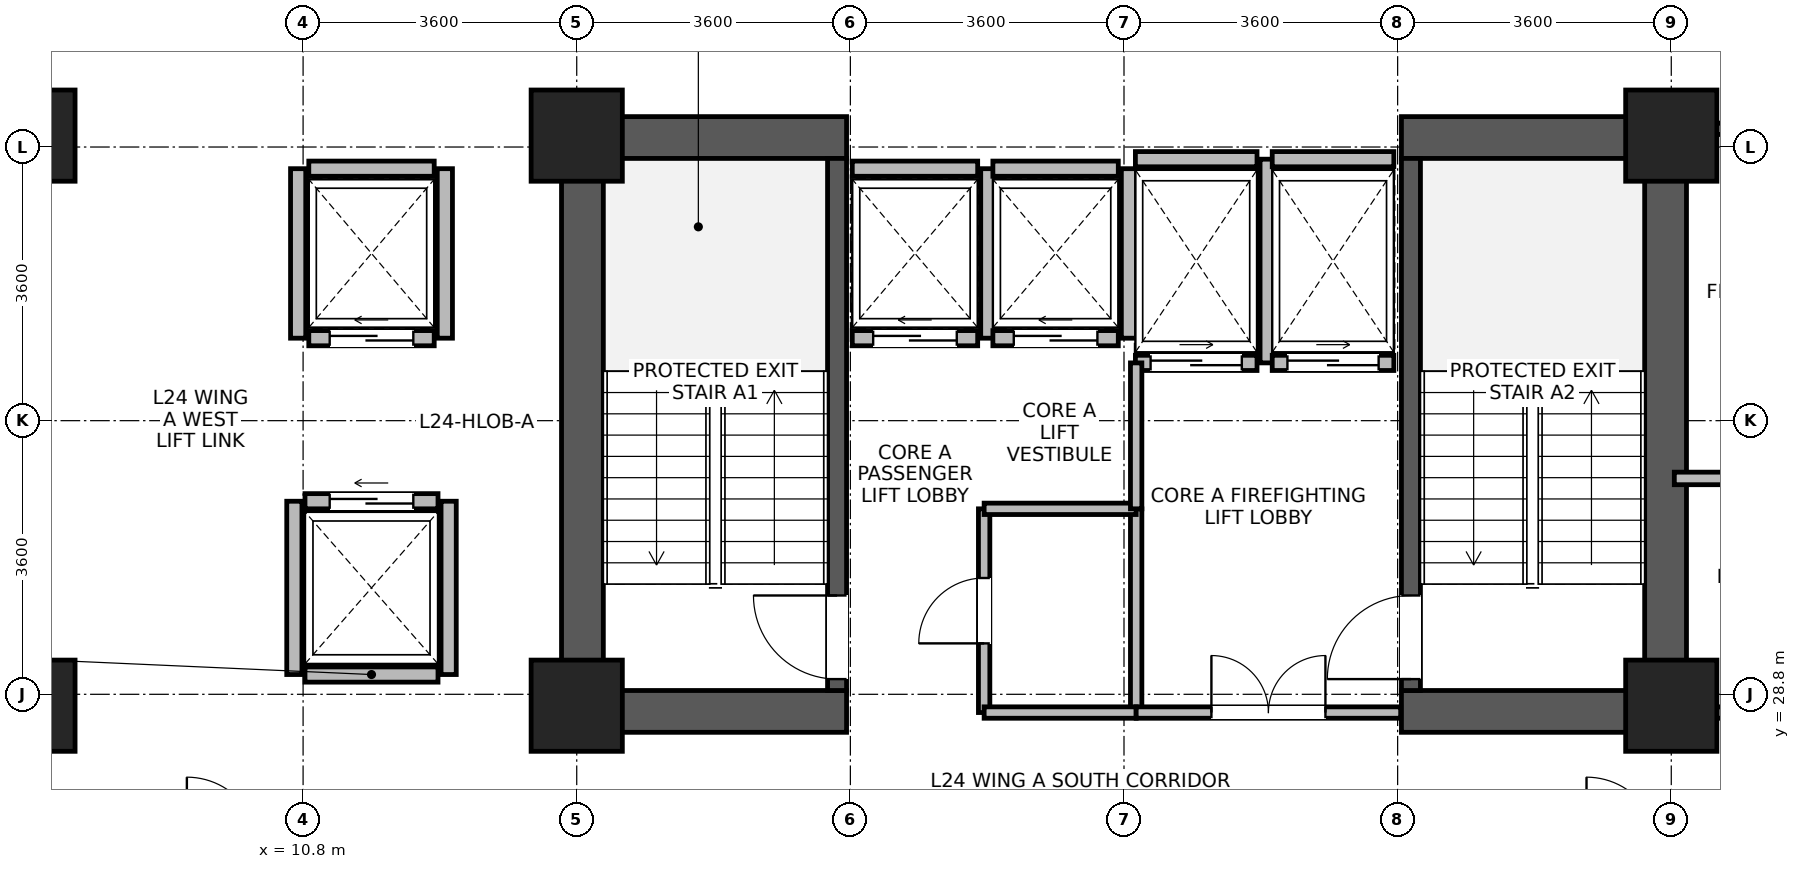
"""IFC4 building model, lengths in metres.
Left out: names, types, materials, properties, quantities, classifications, styles, units other than length and angle.
Written with IfcOpenShell. Run it as: python <this file> out.ifc"""

import sys

from ifc_helpers import new_model, si_unit, direction, frame, frame_2d, origin, origin_2d, place, context, subcontext, project, spatial, rectangle, extrude, source, transform, mapped, element, fill, save


model = new_model("IFC4")
c1 = context("Model", 3, precision=1e-05, world=origin(), true_north=direction((0.0, 1.0)))
c2 = subcontext(c1, "Body", "Model", "MODEL_VIEW")
j1 = project(units=[si_unit("LENGTHUNIT", "METRE"), si_unit("PLANEANGLEUNIT", "RADIAN")], contexts=[c1])
p1 = place(None, origin())
s1 = spatial("IfcSite", under=j1, at=p1, CompositionType="ELEMENT")
p2 = place(p1, origin())
s2 = spatial("IfcBuilding", under=s1, at=p2, CompositionType="ELEMENT")
p3 = place(p2, frame((0.0, 0.0, 97.1)))
s3 = spatial("IfcBuildingStorey", under=s2, at=p3, CompositionType="ELEMENT", Elevation=97.1)
for number, where, z_axis, x_axis in (
    (1, (14.475, 28.3, 0.0), (0.0, 0.0, 1.0), (0.0, 1.0, 0.0)),
    (2, (28.725, 28.3, 0.0), (0.0, 0.0, 1.0), (0.0, 1.0, 0.0)),
):
    element("IfcWall", number, at=place(p3, frame(where, z_axis=z_axis, x_axis=x_axis)), inside=s3, PredefinedType="SHEAR", context=c2, shape_type="SweptSolid", body=[
        extrude(rectangle(XDim=8.1, YDim=0.55, at=frame_2d((4.05, 0.0))), origin(), (0.0, 0.0, 1.0), 3.45),
    ])
for number, where, z_axis, x_axis in (
    (3, (14.75, 28.575, 0.0), (0.0, 0.0, 1.0), (1.0, 0.0, 0.0)),
    (4, (25.25, 28.575, 0.0), (0.0, 0.0, 1.0), (1.0, 0.0, 0.0)),
    (5, (14.75, 36.125, 0.0), (0.0, 0.0, 1.0), (1.0, 0.0, 0.0)),
    (6, (25.25, 36.125, 0.0), (0.0, 0.0, 1.0), (1.0, 0.0, 0.0)),
):
    element("IfcWall", number, at=place(p3, frame(where, z_axis=z_axis, x_axis=x_axis)), inside=s3, PredefinedType="SHEAR", context=c2, shape_type="SweptSolid", body=[
        extrude(rectangle(XDim=3.2, YDim=0.55, at=frame_2d((1.6, 0.0))), origin(), (0.0, 0.0, 1.0), 3.45),
    ])
p4 = place(p3, frame((17.825, 28.85, 0.0), z_axis=(0.0, 0.0, 1.0), x_axis=(0.0, 1.0, 0.0)))
e7 = element("IfcWall", 7, at=p4, inside=s3, PredefinedType="SHEAR", context=c2, shape_type="SweptSolid", body=[
    extrude(rectangle(XDim=7.0, YDim=0.25, at=frame_2d((3.5, 0.0))), origin(), (0.0, 0.0, 1.0), 3.45),
])
p5 = place(p4, frame((0.15, 0.0, 0.0)))
e8 = element("IfcOpeningElement", 8, at=p5, cuts=e7, PredefinedType="OPENING", context=c2, shape_type="SweptSolid", body=[
    extrude(rectangle(XDim=1.1, YDim=2.08, at=frame_2d((0.55, 1.04))), frame((0.0, 0.135, 0.0), z_axis=(0.0, -1.0, 0.0), x_axis=(1.0, 0.0, 0.0)), (0.0, 0.0, 1.0), 0.27),
])
p6 = place(p3, frame((25.375, 28.85, 0.0), z_axis=(0.0, 0.0, 1.0), x_axis=(0.0, 1.0, 0.0)))
e9 = element("IfcWall", 9, at=p6, inside=s3, PredefinedType="SHEAR", context=c2, shape_type="SweptSolid", body=[
    extrude(rectangle(XDim=7.0, YDim=0.25, at=frame_2d((3.5, 0.0))), origin(), (0.0, 0.0, 1.0), 3.45),
])
p7 = place(p6, frame((0.15, 0.0, 0.0)))
e10 = element("IfcOpeningElement", 10, at=p7, cuts=e9, PredefinedType="OPENING", context=c2, shape_type="SweptSolid", body=[
    extrude(rectangle(XDim=1.1, YDim=2.08, at=frame_2d((0.55, 1.04))), frame((0.0, 0.135, 0.0), z_axis=(0.0, -1.0, 0.0), x_axis=(1.0, 0.0, 0.0)), (0.0, 0.0, 1.0), 0.27),
])
m1 = source(origin(), c2, "Body", "SweptSolid", [
    extrude(rectangle(XDim=1.2, YDim=1.2, at=origin_2d()), origin(), (0.0, 0.0, 1.0), 3.7),
])
for number, where, z_axis, x_axis in (
    (11, (7.2, 28.65, 0.0), (0.0, 0.0, 1.0), (1.0, 0.0, 0.0)),
    (12, (7.2, 36.15, 0.0), (0.0, 0.0, 1.0), (1.0, 0.0, 0.0)),
    (13, (14.4, 28.65, 0.0), (0.0, 0.0, 1.0), (1.0, 0.0, 0.0)),
    (14, (14.4, 36.15, 0.0), (0.0, 0.0, 1.0), (1.0, 0.0, 0.0)),
    (15, (28.8, 28.65, 0.0), (0.0, 0.0, 1.0), (1.0, 0.0, 0.0)),
    (16, (28.8, 36.15, 0.0), (0.0, 0.0, 1.0), (1.0, 0.0, 0.0)),
):
    element("IfcColumn", number, at=place(p3, frame(where, z_axis=z_axis, x_axis=x_axis)), inside=s3, PredefinedType="COLUMN", context=c2, shape_type="MappedRepresentation", body=[
        mapped(m1, transform((0.0, 0.0, 0.0), x_axis=(1.0, 0.0, 0.0), y_axis=(0.0, 1.0, 0.0), z_axis=(0.0, 0.0, 1.0), scale=1.0)),
    ])
p8 = place(p3, frame((18.025, 33.485, 0.0), z_axis=(0.0, 0.0, 1.0), x_axis=(1.0, 0.0, 0.0)))
e17 = element("IfcWall", 17, at=p8, inside=s3, PredefinedType="PARTITIONING", context=c2, shape_type="SweptSolid", body=[
    extrude(rectangle(XDim=1.65, YDim=0.2, at=frame_2d((0.825, 0.0))), origin(), (0.0, 0.0, 1.0), 3.43),
])
p9 = place(p8, frame((0.275, 0.0, 0.0)))
e18 = element("IfcOpeningElement", 18, at=p9, cuts=e17, PredefinedType="OPENING", context=c2, shape_type="SweptSolid", body=[
    extrude(rectangle(XDim=1.1, YDim=2.12, at=frame_2d((0.55, 1.06))), frame((0.0, 0.11, 0.0), z_axis=(0.0, -1.0, 0.0), x_axis=(1.0, 0.0, 0.0)), (0.0, 0.0, 1.0), 0.22),
])
p10 = place(p3, frame((18.025, 35.715, 0.0), z_axis=(0.0, 0.0, 1.0), x_axis=(1.0, 0.0, 0.0)))
e19 = element("IfcWall", 19, at=p10, inside=s3, PredefinedType="PARTITIONING", context=c2, shape_type="SweptSolid", body=[
    extrude(rectangle(XDim=1.65, YDim=0.2, at=frame_2d((0.825, 0.0))), origin(), (0.0, 0.0, 1.0), 3.43),
])
p11 = place(p3, frame((19.815, 33.485, 0.0), z_axis=(0.0, 0.0, 1.0), x_axis=(0.0, 1.0, 0.0)))
e20 = element("IfcWall", 20, at=p11, inside=s3, PredefinedType="PARTITIONING", context=c2, shape_type="SweptSolid", body=[
    extrude(rectangle(XDim=2.23, YDim=0.2, at=frame_2d((1.115, 0.0))), origin(), (0.0, 0.0, 1.0), 3.43),
])
p12 = place(p3, frame((19.875, 33.485, 0.0), z_axis=(0.0, 0.0, 1.0), x_axis=(1.0, 0.0, 0.0)))
e21 = element("IfcWall", 21, at=p12, inside=s3, PredefinedType="PARTITIONING", context=c2, shape_type="SweptSolid", body=[
    extrude(rectangle(XDim=1.65, YDim=0.2, at=frame_2d((0.825, 0.0))), origin(), (0.0, 0.0, 1.0), 3.43),
])
p13 = place(p12, frame((0.275, 0.0, 0.0)))
e22 = element("IfcOpeningElement", 22, at=p13, cuts=e21, PredefinedType="OPENING", context=c2, shape_type="SweptSolid", body=[
    extrude(rectangle(XDim=1.1, YDim=2.12, at=frame_2d((0.55, 1.06))), frame((0.0, 0.11, 0.0), z_axis=(0.0, -1.0, 0.0), x_axis=(1.0, 0.0, 0.0)), (0.0, 0.0, 1.0), 0.22),
])
p14 = place(p3, frame((19.875, 35.715, 0.0), z_axis=(0.0, 0.0, 1.0), x_axis=(1.0, 0.0, 0.0)))
e23 = element("IfcWall", 23, at=p14, inside=s3, PredefinedType="PARTITIONING", context=c2, shape_type="SweptSolid", body=[
    extrude(rectangle(XDim=1.65, YDim=0.2, at=frame_2d((0.825, 0.0))), origin(), (0.0, 0.0, 1.0), 3.43),
])
p15 = place(p3, frame((21.665, 33.485, 0.0), z_axis=(0.0, 0.0, 1.0), x_axis=(0.0, 1.0, 0.0)))
e24 = element("IfcWall", 24, at=p15, inside=s3, PredefinedType="PARTITIONING", context=c2, shape_type="SweptSolid", body=[
    extrude(rectangle(XDim=2.23, YDim=0.2, at=frame_2d((1.115, 0.0))), origin(), (0.0, 0.0, 1.0), 3.43),
])
p16 = place(p3, frame((10.825, 29.06, 0.0), z_axis=(0.0, 0.0, 1.0), x_axis=(1.0, 0.0, 0.0)))
e25 = element("IfcWall", 25, at=p16, inside=s3, PredefinedType="PARTITIONING", context=c2, shape_type="SweptSolid", body=[
    extrude(rectangle(XDim=1.75, YDim=0.2, at=frame_2d((0.875, 0.0))), origin(), (0.0, 0.0, 1.0), 3.43),
])
p17 = place(p3, frame((10.825, 31.34, 0.0), z_axis=(0.0, 0.0, 1.0), x_axis=(1.0, 0.0, 0.0)))
e26 = element("IfcWall", 26, at=p17, inside=s3, PredefinedType="PARTITIONING", context=c2, shape_type="SweptSolid", body=[
    extrude(rectangle(XDim=1.75, YDim=0.2, at=frame_2d((0.875, 0.0))), origin(), (0.0, 0.0, 1.0), 3.43),
])
p18 = place(p17, frame((0.325, 0.0, 0.0)))
e27 = element("IfcOpeningElement", 27, at=p18, cuts=e26, PredefinedType="OPENING", context=c2, shape_type="SweptSolid", body=[
    extrude(rectangle(XDim=1.1, YDim=2.12, at=frame_2d((0.55, 1.06))), frame((0.0, 0.11, 0.0), z_axis=(0.0, -1.0, 0.0), x_axis=(1.0, 0.0, 0.0)), (0.0, 0.0, 1.0), 0.22),
])
for number, where, z_axis, x_axis in (
    (28, (10.685, 29.06, 0.0), (0.0, 0.0, 1.0), (0.0, 1.0, 0.0)),
    (29, (12.715, 29.06, 0.0), (0.0, 0.0, 1.0), (0.0, 1.0, 0.0)),
):
    element("IfcWall", number, at=place(p3, frame(where, z_axis=z_axis, x_axis=x_axis)), inside=s3, PredefinedType="PARTITIONING", context=c2, shape_type="SweptSolid", body=[
        extrude(rectangle(XDim=2.28, YDim=0.2, at=frame_2d((1.14, 0.0))), origin(), (0.0, 0.0, 1.0), 3.43),
    ])
p19 = place(p3, frame((10.875, 33.485, 0.0), z_axis=(0.0, 0.0, 1.0), x_axis=(1.0, 0.0, 0.0)))
e30 = element("IfcWall", 30, at=p19, inside=s3, PredefinedType="PARTITIONING", context=c2, shape_type="SweptSolid", body=[
    extrude(rectangle(XDim=1.65, YDim=0.2, at=frame_2d((0.825, 0.0))), origin(), (0.0, 0.0, 1.0), 3.43),
])
p20 = place(p19, frame((0.275, 0.0, 0.0)))
e31 = element("IfcOpeningElement", 31, at=p20, cuts=e30, PredefinedType="OPENING", context=c2, shape_type="SweptSolid", body=[
    extrude(rectangle(XDim=1.1, YDim=2.12, at=frame_2d((0.55, 1.06))), frame((0.0, 0.11, 0.0), z_axis=(0.0, -1.0, 0.0), x_axis=(1.0, 0.0, 0.0)), (0.0, 0.0, 1.0), 0.22),
])
p21 = place(p3, frame((10.875, 35.715, 0.0), z_axis=(0.0, 0.0, 1.0), x_axis=(1.0, 0.0, 0.0)))
e32 = element("IfcWall", 32, at=p21, inside=s3, PredefinedType="PARTITIONING", context=c2, shape_type="SweptSolid", body=[
    extrude(rectangle(XDim=1.65, YDim=0.2, at=frame_2d((0.825, 0.0))), origin(), (0.0, 0.0, 1.0), 3.43),
])
for number, where, z_axis, x_axis in (
    (33, (10.735, 33.485, 0.0), (0.0, 0.0, 1.0), (0.0, 1.0, 0.0)),
    (34, (12.665, 33.485, 0.0), (0.0, 0.0, 1.0), (0.0, 1.0, 0.0)),
):
    element("IfcWall", number, at=place(p3, frame(where, z_axis=z_axis, x_axis=x_axis)), inside=s3, PredefinedType="PARTITIONING", context=c2, shape_type="SweptSolid", body=[
        extrude(rectangle(XDim=2.23, YDim=0.2, at=frame_2d((1.115, 0.0))), origin(), (0.0, 0.0, 1.0), 3.43),
    ])
p22 = place(p3, frame((21.75, 33.16, 0.0), z_axis=(0.0, 0.0, 1.0), x_axis=(1.0, 0.0, 0.0)))
e35 = element("IfcWall", 35, at=p22, inside=s3, PredefinedType="PARTITIONING", context=c2, shape_type="SweptSolid", body=[
    extrude(rectangle(XDim=1.6, YDim=0.2, at=frame_2d((0.8, 0.0))), origin(), (0.0, 0.0, 1.0), 3.43),
])
p23 = place(p22, frame((0.2, 0.0, 0.0)))
e36 = element("IfcOpeningElement", 36, at=p23, cuts=e35, PredefinedType="OPENING", context=c2, shape_type="SweptSolid", body=[
    extrude(rectangle(XDim=1.2, YDim=2.12, at=frame_2d((0.6, 1.06))), frame((0.0, 0.11, 0.0), z_axis=(0.0, -1.0, 0.0), x_axis=(1.0, 0.0, 0.0)), (0.0, 0.0, 1.0), 0.22),
])
p24 = place(p3, frame((21.75, 35.84, 0.0), z_axis=(0.0, 0.0, 1.0), x_axis=(1.0, 0.0, 0.0)))
e37 = element("IfcWall", 37, at=p24, inside=s3, PredefinedType="PARTITIONING", context=c2, shape_type="SweptSolid", body=[
    extrude(rectangle(XDim=1.6, YDim=0.2, at=frame_2d((0.8, 0.0))), origin(), (0.0, 0.0, 1.0), 2.43),
])
p25 = place(p3, frame((23.49, 33.16, 0.0), z_axis=(0.0, 0.0, 1.0), x_axis=(0.0, 1.0, 0.0)))
e38 = element("IfcWall", 38, at=p25, inside=s3, PredefinedType="PARTITIONING", context=c2, shape_type="SweptSolid", body=[
    extrude(rectangle(XDim=2.68, YDim=0.2, at=frame_2d((1.34, 0.0))), origin(), (0.0, 0.0, 1.0), 3.43),
])
p26 = place(p3, frame((23.55, 33.16, 0.0), z_axis=(0.0, 0.0, 1.0), x_axis=(1.0, 0.0, 0.0)))
e39 = element("IfcWall", 39, at=p26, inside=s3, PredefinedType="PARTITIONING", context=c2, shape_type="SweptSolid", body=[
    extrude(rectangle(XDim=1.6, YDim=0.2, at=frame_2d((0.8, 0.0))), origin(), (0.0, 0.0, 1.0), 3.43),
])
p27 = place(p26, frame((0.2, 0.0, 0.0)))
e40 = element("IfcOpeningElement", 40, at=p27, cuts=e39, PredefinedType="OPENING", context=c2, shape_type="SweptSolid", body=[
    extrude(rectangle(XDim=1.2, YDim=2.12, at=frame_2d((0.6, 1.06))), frame((0.0, 0.11, 0.0), z_axis=(0.0, -1.0, 0.0), x_axis=(1.0, 0.0, 0.0)), (0.0, 0.0, 1.0), 0.22),
])
p28 = place(p3, frame((23.55, 35.84, 0.0), z_axis=(0.0, 0.0, 1.0), x_axis=(1.0, 0.0, 0.0)))
e41 = element("IfcWall", 41, at=p28, inside=s3, PredefinedType="PARTITIONING", context=c2, shape_type="SweptSolid", body=[
    extrude(rectangle(XDim=1.6, YDim=0.2, at=frame_2d((0.8, 0.0))), origin(), (0.0, 0.0, 1.0), 2.43),
])
p29 = place(p3, frame((29.4, 28.56, 0.0), z_axis=(0.0, 0.0, 1.0), x_axis=(1.0, 0.0, 0.0)))
e42 = element("IfcWall", 42, at=p29, inside=s3, PredefinedType="PARTITIONING", context=c2, shape_type="SweptSolid", body=[
    extrude(rectangle(XDim=3.96, YDim=0.15, at=frame_2d((1.98, 0.0))), origin(), (0.0, 0.0, 1.0), 2.78),
])
p30 = place(p29, frame((1.55, 0.0, 0.0)))
e43 = element("IfcOpeningElement", 43, at=p30, cuts=e42, PredefinedType="OPENING", context=c2, shape_type="SweptSolid", body=[
    extrude(rectangle(XDim=0.86, YDim=2.02, at=frame_2d((0.43, 1.01))), frame((0.0, 0.085, 0.0), z_axis=(0.0, -1.0, 0.0), x_axis=(1.0, 0.0, 0.0)), (0.0, 0.0, 1.0), 0.17),
])
p31 = place(p3, frame((29.4, 36.24, 0.0), z_axis=(0.0, 0.0, 1.0), x_axis=(1.0, 0.0, 0.0)))
e44 = element("IfcWall", 44, at=p31, inside=s3, PredefinedType="PARTITIONING", context=c2, shape_type="SweptSolid", body=[
    extrude(rectangle(XDim=3.96, YDim=0.15, at=frame_2d((1.98, 0.0))), origin(), (0.0, 0.0, 1.0), 2.78),
])
p32 = place(p3, frame((19.76, 28.56, 0.0), z_axis=(0.0, 0.0, 1.0), x_axis=(0.0, 1.0, 0.0)))
e45 = element("IfcWall", 45, at=p32, inside=s3, PredefinedType="PARTITIONING", context=c2, shape_type="SweptSolid", body=[
    extrude(rectangle(XDim=2.68, YDim=0.15, at=frame_2d((1.34, 0.0))), origin(), (0.0, 0.0, 1.0), 3.43),
])
p33 = place(p32, frame((0.91, 0.0, 0.0)))
e46 = element("IfcOpeningElement", 46, at=p33, cuts=e45, PredefinedType="OPENING", context=c2, shape_type="SweptSolid", body=[
    extrude(rectangle(XDim=0.86, YDim=2.02, at=frame_2d((0.43, 1.01))), frame((0.0, 0.085, 0.0), z_axis=(0.0, -1.0, 0.0), x_axis=(1.0, 0.0, 0.0)), (0.0, 0.0, 1.0), 0.17),
])
p34 = place(p3, frame((21.76, 28.56, 0.0), z_axis=(0.0, 0.0, 1.0), x_axis=(0.0, 1.0, 0.0)))
e47 = element("IfcWall", 47, at=p34, inside=s3, PredefinedType="PARTITIONING", context=c2, shape_type="SweptSolid", body=[
    extrude(rectangle(XDim=2.68, YDim=0.15, at=frame_2d((1.34, 0.0))), origin(), (0.0, 0.0, 1.0), 3.43),
])
p35 = place(p3, frame((19.76, 28.56, 0.0), z_axis=(0.0, 0.0, 1.0), x_axis=(1.0, 0.0, 0.0)))
e48 = element("IfcWall", 48, at=p35, inside=s3, PredefinedType="PARTITIONING", context=c2, shape_type="SweptSolid", body=[
    extrude(rectangle(XDim=2.0, YDim=0.15, at=frame_2d((1.0, 0.0))), origin(), (0.0, 0.0, 1.0), 2.43),
])
p36 = place(p3, frame((19.76, 31.24, 0.0), z_axis=(0.0, 0.0, 1.0), x_axis=(1.0, 0.0, 0.0)))
e49 = element("IfcWall", 49, at=p36, inside=s3, PredefinedType="PARTITIONING", context=c2, shape_type="SweptSolid", body=[
    extrude(rectangle(XDim=2.0, YDim=0.15, at=frame_2d((1.0, 0.0))), origin(), (0.0, 0.0, 1.0), 3.43),
])
p37 = place(p3, frame((28.84, 31.64, 0.0), z_axis=(0.0, 0.0, 1.0), x_axis=(1.0, 0.0, 0.0)))
e50 = element("IfcWall", 50, at=p37, inside=s3, PredefinedType="PARTITIONING", context=c2, shape_type="SweptSolid", body=[
    extrude(rectangle(XDim=4.52, YDim=0.165, at=frame_2d((2.26, 0.0))), origin(), (0.0, 0.0, 1.0), 3.43),
])
p38 = place(p3, frame((21.76, 28.56, 0.0), z_axis=(0.0, 0.0, 1.0), x_axis=(1.0, 0.0, 0.0)))
e51 = element("IfcWall", 51, at=p38, inside=s3, PredefinedType="PARTITIONING", context=c2, shape_type="SweptSolid", body=[
    extrude(rectangle(XDim=3.48, YDim=0.15, at=frame_2d((1.74, 0.0))), origin(), (0.0, 0.0, 1.0), 2.43),
])
p39 = place(p38, frame((0.99, 0.0, 0.0)))
e52 = element("IfcOpeningElement", 52, at=p39, cuts=e51, PredefinedType="OPENING", context=c2, shape_type="SweptSolid", body=[
    extrude(rectangle(XDim=1.5, YDim=2.1, at=frame_2d((0.75, 1.05))), frame((0.0, 0.085, 0.0), z_axis=(0.0, -1.0, 0.0), x_axis=(1.0, 0.0, 0.0)), (0.0, 0.0, 1.0), 0.17),
])
p40 = place(p3, frame((21.76, 31.24, 0.0), z_axis=(0.0, 0.0, 1.0), x_axis=(0.0, 1.0, 0.0)))
e53 = element("IfcWall", 53, at=p40, inside=s3, PredefinedType="PARTITIONING", context=c2, shape_type="SweptSolid", body=[
    extrude(rectangle(XDim=1.92, YDim=0.15, at=frame_2d((0.96, 0.0))), origin(), (0.0, 0.0, 1.0), 3.43),
])
p41 = place(p5, origin())
e54 = element("IfcDoor", 54, at=p41, inside=s3, OperationType="SINGLE_SWING_RIGHT", PredefinedType="DOOR", context=c2, shape_type="SweptSolid", body=[
    extrude(rectangle(XDim=1.1, YDim=2.08, at=frame_2d((0.55, 1.04))), frame((0.0, 0.025, 0.0), z_axis=(0.0, -1.0, 0.0), x_axis=(1.0, 0.0, 0.0)), (0.0, 0.0, 1.0), 0.05),
])
fill(e8, e54)
p42 = place(p7, origin())
e55 = element("IfcDoor", 55, at=p42, inside=s3, OperationType="SINGLE_SWING_LEFT", PredefinedType="DOOR", context=c2, shape_type="SweptSolid", body=[
    extrude(rectangle(XDim=1.1, YDim=2.08, at=frame_2d((0.55, 1.04))), frame((0.0, 0.025, 0.0), z_axis=(0.0, -1.0, 0.0), x_axis=(1.0, 0.0, 0.0)), (0.0, 0.0, 1.0), 0.05),
])
fill(e10, e55)
p43 = place(p9, origin())
e56 = element("IfcDoor", 56, at=p43, inside=s3, OperationType="SLIDING_TO_LEFT", PredefinedType="DOOR", context=c2, shape_type="SweptSolid", body=[
    extrude(rectangle(XDim=1.1, YDim=2.12, at=frame_2d((0.55, 1.06))), frame((0.0, 0.025, 0.0), z_axis=(0.0, -1.0, 0.0), x_axis=(1.0, 0.0, 0.0)), (0.0, 0.0, 1.0), 0.05),
])
fill(e18, e56)
p44 = place(p13, origin())
e57 = element("IfcDoor", 57, at=p44, inside=s3, OperationType="SLIDING_TO_LEFT", PredefinedType="DOOR", context=c2, shape_type="SweptSolid", body=[
    extrude(rectangle(XDim=1.1, YDim=2.12, at=frame_2d((0.55, 1.06))), frame((0.0, 0.025, 0.0), z_axis=(0.0, -1.0, 0.0), x_axis=(1.0, 0.0, 0.0)), (0.0, 0.0, 1.0), 0.05),
])
fill(e22, e57)
p45 = place(p18, origin())
e58 = element("IfcDoor", 58, at=p45, inside=s3, OperationType="SLIDING_TO_LEFT", PredefinedType="DOOR", context=c2, shape_type="SweptSolid", body=[
    extrude(rectangle(XDim=1.1, YDim=2.12, at=frame_2d((0.55, 1.06))), frame((0.0, 0.025, 0.0), z_axis=(0.0, -1.0, 0.0), x_axis=(1.0, 0.0, 0.0)), (0.0, 0.0, 1.0), 0.05),
])
fill(e27, e58)
p46 = place(p20, origin())
e59 = element("IfcDoor", 59, at=p46, inside=s3, OperationType="SLIDING_TO_LEFT", PredefinedType="DOOR", context=c2, shape_type="SweptSolid", body=[
    extrude(rectangle(XDim=1.1, YDim=2.12, at=frame_2d((0.55, 1.06))), frame((0.0, 0.025, 0.0), z_axis=(0.0, -1.0, 0.0), x_axis=(1.0, 0.0, 0.0)), (0.0, 0.0, 1.0), 0.05),
])
fill(e31, e59)
p47 = place(p23, origin())
e60 = element("IfcDoor", 60, at=p47, inside=s3, OperationType="SLIDING_TO_RIGHT", PredefinedType="DOOR", context=c2, shape_type="SweptSolid", body=[
    extrude(rectangle(XDim=1.2, YDim=2.12, at=frame_2d((0.6, 1.06))), frame((0.0, 0.025, 0.0), z_axis=(0.0, -1.0, 0.0), x_axis=(1.0, 0.0, 0.0)), (0.0, 0.0, 1.0), 0.05),
])
fill(e36, e60)
p48 = place(p27, origin())
e61 = element("IfcDoor", 61, at=p48, inside=s3, OperationType="SLIDING_TO_RIGHT", PredefinedType="DOOR", context=c2, shape_type="SweptSolid", body=[
    extrude(rectangle(XDim=1.2, YDim=2.12, at=frame_2d((0.6, 1.06))), frame((0.0, 0.025, 0.0), z_axis=(0.0, -1.0, 0.0), x_axis=(1.0, 0.0, 0.0)), (0.0, 0.0, 1.0), 0.05),
])
fill(e40, e61)
p49 = place(p33, origin())
e62 = element("IfcDoor", 62, at=p49, inside=s3, OperationType="SINGLE_SWING_LEFT", PredefinedType="DOOR", context=c2, shape_type="SweptSolid", body=[
    extrude(rectangle(XDim=0.86, YDim=2.02, at=frame_2d((0.43, 1.01))), frame((0.0, 0.025, 0.0), z_axis=(0.0, -1.0, 0.0), x_axis=(1.0, 0.0, 0.0)), (0.0, 0.0, 1.0), 0.05),
])
fill(e46, e62)
p50 = place(p39, origin())
e63 = element("IfcDoor", 63, at=p50, inside=s3, OperationType="DOUBLE_DOOR_SINGLE_SWING", PredefinedType="DOOR", context=c2, shape_type="SweptSolid", body=[
    extrude(rectangle(XDim=1.5, YDim=2.1, at=frame_2d((0.75, 1.05))), frame((0.0, 0.025, 0.0), z_axis=(0.0, -1.0, 0.0), x_axis=(1.0, 0.0, 0.0)), (0.0, 0.0, 1.0), 0.05),
])
fill(e52, e63)
save(model, sys.argv[1])
